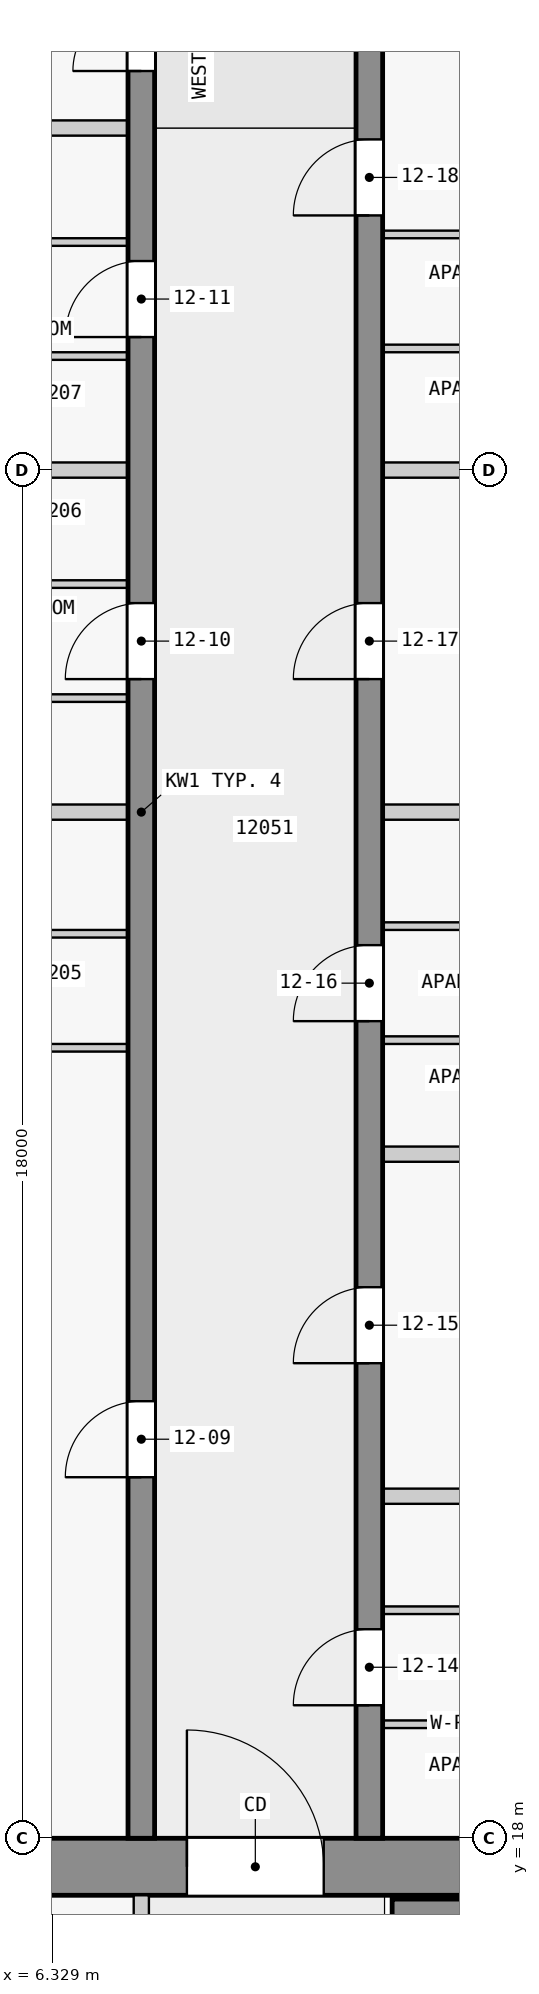
"""IFC4 building model, lengths in metres.
Left out: names, types, materials, properties, quantities, classifications, styles, units other than length and angle.
Written with IfcOpenShell. Run it as: python <this file> out.ifc"""

import sys

from ifc_helpers import new_model, si_unit, direction, frame, frame_2d, origin, place, context, subcontext, project, spatial, rectangle, extrude, element, fill, save


model = new_model("IFC4")
c1 = context("Model", 3, precision=1e-05, world=origin(), true_north=direction((0.0, 1.0)))
c2 = subcontext(c1, "Body", "Model", "MODEL_VIEW")
j1 = project(units=[si_unit("LENGTHUNIT", "METRE"), si_unit("PLANEANGLEUNIT", "RADIAN")], contexts=[c1])
p1 = place(None, origin())
s1 = spatial("IfcSite", under=j1, at=p1, CompositionType="ELEMENT")
p2 = place(p1, origin())
s2 = spatial("IfcBuilding", under=s1, at=p2, CompositionType="ELEMENT")
p3 = place(p2, frame((0.0, 0.0, 51.3)))
s3 = spatial("IfcBuildingStorey", under=s2, at=p3, CompositionType="ELEMENT", Elevation=51.3)
p4 = place(p3, frame((1.55, 17.625, 0.0), z_axis=(0.0, 0.0, 1.0), x_axis=(1.0, 0.0, 0.0)))
e1 = element("IfcWall", 1, at=p4, inside=s3, PredefinedType="SHEAR", context=c2, shape_type="SweptSolid", body=[
    extrude(rectangle(XDim=20.95, YDim=0.75, at=frame_2d((10.475, 0.0))), origin(), (0.0, 0.0, 1.0), 3.25),
])
p5 = place(p4, frame((6.55, 0.0, 0.0)))
e2 = element("IfcOpeningElement", 2, at=p5, cuts=e1, PredefinedType="OPENING", context=c2, shape_type="SweptSolid", body=[
    extrude(rectangle(XDim=1.8, YDim=2.1, at=frame_2d((0.9, 1.05))), frame((0.0, 0.385, 0.0), z_axis=(0.0, -1.0, 0.0), x_axis=(1.0, 0.0, 0.0)), (0.0, 0.0, 1.0), 0.77),
])
p6 = place(p3, frame((10.8, 17.05, 0.0), z_axis=(0.0, 0.0, 1.0), x_axis=(1.0, 0.0, 0.0)))
e3 = element("IfcWall", 3, at=p6, inside=s3, PredefinedType="SHEAR", context=c2, shape_type="SweptSolid", body=[
    extrude(rectangle(XDim=7.8, YDim=0.3, at=frame_2d((3.9, 0.0))), origin(), (0.0, 0.0, 1.0), 3.25),
])
p7 = place(p3, frame((7.5, 18.0, 0.0), z_axis=(0.0, 0.0, 1.0), x_axis=(0.0, 1.0, 0.0)))
e4 = element("IfcWall", 4, at=p7, inside=s3, PredefinedType="SHEAR", context=c2, shape_type="SweptSolid", body=[
    extrude(rectangle(XDim=27.0, YDim=0.35, at=frame_2d((13.5, 0.0))), origin(), (0.0, 0.0, 1.0), 3.25),
])
p8 = place(p7, frame((4.75, 0.0, 0.0)))
e5 = element("IfcOpeningElement", 5, at=p8, cuts=e4, PredefinedType="OPENING", context=c2, shape_type="SweptSolid", body=[
    extrude(rectangle(XDim=1.0, YDim=2.1, at=frame_2d((0.5, 1.05))), frame((0.0, 0.185, 0.0), z_axis=(0.0, -1.0, 0.0), x_axis=(1.0, 0.0, 0.0)), (0.0, 0.0, 1.0), 0.37),
])
p9 = place(p7, frame((15.25, 0.0, 0.0)))
e6 = element("IfcOpeningElement", 6, at=p9, cuts=e4, PredefinedType="OPENING", context=c2, shape_type="SweptSolid", body=[
    extrude(rectangle(XDim=1.0, YDim=2.1, at=frame_2d((0.5, 1.05))), frame((0.0, 0.185, 0.0), z_axis=(0.0, -1.0, 0.0), x_axis=(1.0, 0.0, 0.0)), (0.0, 0.0, 1.0), 0.37),
])
p10 = place(p7, frame((19.75, 0.0, 0.0)))
e7 = element("IfcOpeningElement", 7, at=p10, cuts=e4, PredefinedType="OPENING", context=c2, shape_type="SweptSolid", body=[
    extrude(rectangle(XDim=1.0, YDim=2.1, at=frame_2d((0.5, 1.05))), frame((0.0, 0.185, 0.0), z_axis=(0.0, -1.0, 0.0), x_axis=(1.0, 0.0, 0.0)), (0.0, 0.0, 1.0), 0.37),
])
p11 = place(p7, frame((23.25, 0.0, 0.0)))
e8 = element("IfcOpeningElement", 8, at=p11, cuts=e4, PredefinedType="OPENING", context=c2, shape_type="SweptSolid", body=[
    extrude(rectangle(XDim=0.9, YDim=2.1, at=frame_2d((0.45, 1.05))), frame((0.0, 0.185, 0.0), z_axis=(0.0, -1.0, 0.0), x_axis=(1.0, 0.0, 0.0)), (0.0, 0.0, 1.0), 0.37),
])
p12 = place(p7, frame((25.45, 0.0, 0.0)))
e9 = element("IfcOpeningElement", 9, at=p12, cuts=e4, PredefinedType="OPENING", context=c2, shape_type="SweptSolid", body=[
    extrude(rectangle(XDim=1.0, YDim=2.1, at=frame_2d((0.5, 1.05))), frame((0.0, 0.185, 0.0), z_axis=(0.0, -1.0, 0.0), x_axis=(1.0, 0.0, 0.0)), (0.0, 0.0, 1.0), 0.37),
])
p13 = place(p3, frame((10.5, 18.0, 0.0), z_axis=(0.0, 0.0, 1.0), x_axis=(0.0, 1.0, 0.0)))
e10 = element("IfcWall", 10, at=p13, inside=s3, PredefinedType="SHEAR", context=c2, shape_type="SweptSolid", body=[
    extrude(rectangle(XDim=27.0, YDim=0.35, at=frame_2d((13.5, 0.0))), origin(), (0.0, 0.0, 1.0), 3.25),
])
p14 = place(p13, frame((1.75, 0.0, 0.0)))
e11 = element("IfcOpeningElement", 11, at=p14, cuts=e10, PredefinedType="OPENING", context=c2, shape_type="SweptSolid", body=[
    extrude(rectangle(XDim=1.0, YDim=2.1, at=frame_2d((0.5, 1.05))), frame((0.0, 0.185, 0.0), z_axis=(0.0, -1.0, 0.0), x_axis=(1.0, 0.0, 0.0)), (0.0, 0.0, 1.0), 0.37),
])
p15 = place(p13, frame((6.25, 0.0, 0.0)))
e12 = element("IfcOpeningElement", 12, at=p15, cuts=e10, PredefinedType="OPENING", context=c2, shape_type="SweptSolid", body=[
    extrude(rectangle(XDim=1.0, YDim=2.1, at=frame_2d((0.5, 1.05))), frame((0.0, 0.185, 0.0), z_axis=(0.0, -1.0, 0.0), x_axis=(1.0, 0.0, 0.0)), (0.0, 0.0, 1.0), 0.37),
])
p16 = place(p13, frame((10.75, 0.0, 0.0)))
e13 = element("IfcOpeningElement", 13, at=p16, cuts=e10, PredefinedType="OPENING", context=c2, shape_type="SweptSolid", body=[
    extrude(rectangle(XDim=1.0, YDim=2.1, at=frame_2d((0.5, 1.05))), frame((0.0, 0.185, 0.0), z_axis=(0.0, -1.0, 0.0), x_axis=(1.0, 0.0, 0.0)), (0.0, 0.0, 1.0), 0.37),
])
p17 = place(p13, frame((15.25, 0.0, 0.0)))
e14 = element("IfcOpeningElement", 14, at=p17, cuts=e10, PredefinedType="OPENING", context=c2, shape_type="SweptSolid", body=[
    extrude(rectangle(XDim=1.0, YDim=2.1, at=frame_2d((0.5, 1.05))), frame((0.0, 0.185, 0.0), z_axis=(0.0, -1.0, 0.0), x_axis=(1.0, 0.0, 0.0)), (0.0, 0.0, 1.0), 0.37),
])
p18 = place(p13, frame((21.35, 0.0, 0.0)))
e15 = element("IfcOpeningElement", 15, at=p18, cuts=e10, PredefinedType="OPENING", context=c2, shape_type="SweptSolid", body=[
    extrude(rectangle(XDim=1.0, YDim=2.1, at=frame_2d((0.5, 1.05))), frame((0.0, 0.185, 0.0), z_axis=(0.0, -1.0, 0.0), x_axis=(1.0, 0.0, 0.0)), (0.0, 0.0, 1.0), 0.37),
])
p19 = place(p3, frame((7.5, 10.1, 0.0), z_axis=(0.0, 0.0, 1.0), x_axis=(0.0, 1.0, 0.0)))
e16 = element("IfcWall", 16, at=p19, inside=s3, PredefinedType="PARTITIONING", context=c2, shape_type="SweptSolid", body=[
    extrude(rectangle(XDim=7.15, YDim=0.2, at=frame_2d((3.575, 0.0))), origin(), (0.0, 0.0, 1.0), 3.25),
])
p20 = place(p19, frame((1.5, 0.0, 0.0)))
e17 = element("IfcOpeningElement", 17, at=p20, cuts=e16, PredefinedType="OPENING", context=c2, shape_type="SweptSolid", body=[
    extrude(rectangle(XDim=0.9, YDim=2.1, at=frame_2d((0.45, 1.05))), frame((0.0, 0.11, 0.0), z_axis=(0.0, -1.0, 0.0), x_axis=(1.0, 0.0, 0.0)), (0.0, 0.0, 1.0), 0.22),
])
p21 = place(p19, frame((5.075, 0.0, 0.0)))
e18 = element("IfcOpeningElement", 18, at=p21, cuts=e16, PredefinedType="OPENING", context=c2, shape_type="SweptSolid", body=[
    extrude(rectangle(XDim=0.9, YDim=2.1, at=frame_2d((0.45, 1.05))), frame((0.0, 0.11, 0.0), z_axis=(0.0, -1.0, 0.0), x_axis=(1.0, 0.0, 0.0)), (0.0, 0.0, 1.0), 0.22),
])
p22 = place(p3, frame((14.075, 19.5, 0.0), z_axis=(0.0, 0.0, 1.0), x_axis=(-1.0, 0.0, 0.0)))
e19 = element("IfcWall", 19, at=p22, inside=s3, PredefinedType="PARTITIONING", context=c2, shape_type="SweptSolid", body=[
    extrude(rectangle(XDim=3.4, YDim=0.1, at=frame_2d((1.7, 0.0))), origin(), (0.0, 0.0, 1.0), 3.25),
])
p23 = place(p22, frame((1.25, 0.0, 0.0)))
e20 = element("IfcOpeningElement", 20, at=p23, cuts=e19, PredefinedType="OPENING", context=c2, shape_type="SweptSolid", body=[
    extrude(rectangle(XDim=0.9, YDim=2.1, at=frame_2d((0.45, 1.05))), frame((0.0, 0.06, 0.0), z_axis=(0.0, -1.0, 0.0), x_axis=(1.0, 0.0, 0.0)), (0.0, 0.0, 1.0), 0.12),
])
p24 = place(p3, frame((10.675, 21.0, 0.0), z_axis=(0.0, 0.0, 1.0), x_axis=(1.0, 0.0, 0.0)))
e21 = element("IfcWall", 21, at=p24, inside=s3, PredefinedType="PARTITIONING", context=c2, shape_type="SweptSolid", body=[
    extrude(rectangle(XDim=3.4, YDim=0.1, at=frame_2d((1.7, 0.0))), origin(), (0.0, 0.0, 1.0), 3.25),
])
p25 = place(p24, frame((1.25, 0.0, 0.0)))
e22 = element("IfcOpeningElement", 22, at=p25, cuts=e21, PredefinedType="OPENING", context=c2, shape_type="SweptSolid", body=[
    extrude(rectangle(XDim=0.9, YDim=2.1, at=frame_2d((0.45, 1.05))), frame((0.0, 0.06, 0.0), z_axis=(0.0, -1.0, 0.0), x_axis=(1.0, 0.0, 0.0)), (0.0, 0.0, 1.0), 0.12),
])
p26 = place(p3, frame((13.975, 22.5, 0.0), z_axis=(0.0, 0.0, 1.0), x_axis=(-1.0, 0.0, 0.0)))
e23 = element("IfcWall", 23, at=p26, inside=s3, PredefinedType="PARTITIONING", context=c2, shape_type="SweptSolid", body=[
    extrude(rectangle(XDim=3.3, YDim=0.2, at=frame_2d((1.65, 0.0))), origin(), (0.0, 0.0, 1.0), 3.25),
])
p27 = place(p3, frame((18.08, 27.0, 0.0), z_axis=(0.0, 0.0, 1.0), x_axis=(-1.0, 0.0, 0.0)))
e24 = element("IfcWall", 24, at=p27, inside=s3, PredefinedType="PARTITIONING", context=c2, shape_type="SweptSolid", body=[
    extrude(rectangle(XDim=7.405, YDim=0.2, at=frame_2d((3.703, 0.0))), origin(), (0.0, 0.0, 1.0), 3.25),
])
p28 = place(p3, frame((3.975, 28.4, 0.0), z_axis=(0.0, 0.0, 1.0), x_axis=(1.0, 0.0, 0.0)))
e25 = element("IfcWall", 25, at=p28, inside=s3, PredefinedType="PARTITIONING", context=c2, shape_type="SweptSolid", body=[
    extrude(rectangle(XDim=3.35, YDim=0.1, at=frame_2d((1.675, 0.0))), origin(), (0.0, 0.0, 1.0), 3.25),
])
p29 = place(p28, frame((1.25, 0.0, 0.0)))
e26 = element("IfcOpeningElement", 26, at=p29, cuts=e25, PredefinedType="OPENING", context=c2, shape_type="SweptSolid", body=[
    extrude(rectangle(XDim=0.9, YDim=2.1, at=frame_2d((0.45, 1.05))), frame((0.0, 0.06, 0.0), z_axis=(0.0, -1.0, 0.0), x_axis=(1.0, 0.0, 0.0)), (0.0, 0.0, 1.0), 0.12),
])
p30 = place(p3, frame((14.075, 28.5, 0.0), z_axis=(0.0, 0.0, 1.0), x_axis=(-1.0, 0.0, 0.0)))
e27 = element("IfcWall", 27, at=p30, inside=s3, PredefinedType="PARTITIONING", context=c2, shape_type="SweptSolid", body=[
    extrude(rectangle(XDim=3.4, YDim=0.1, at=frame_2d((1.7, 0.0))), origin(), (0.0, 0.0, 1.0), 3.25),
])
p31 = place(p30, frame((1.25, 0.0, 0.0)))
e28 = element("IfcOpeningElement", 28, at=p31, cuts=e27, PredefinedType="OPENING", context=c2, shape_type="SweptSolid", body=[
    extrude(rectangle(XDim=0.9, YDim=2.1, at=frame_2d((0.45, 1.05))), frame((0.0, 0.06, 0.0), z_axis=(0.0, -1.0, 0.0), x_axis=(1.0, 0.0, 0.0)), (0.0, 0.0, 1.0), 0.12),
])
p32 = place(p3, frame((7.325, 29.9, 0.0), z_axis=(0.0, 0.0, 1.0), x_axis=(-1.0, 0.0, 0.0)))
e29 = element("IfcWall", 29, at=p32, inside=s3, PredefinedType="PARTITIONING", context=c2, shape_type="SweptSolid", body=[
    extrude(rectangle(XDim=3.35, YDim=0.1, at=frame_2d((1.675, 0.0))), origin(), (0.0, 0.0, 1.0), 3.25),
])
p33 = place(p3, frame((10.675, 30.0, 0.0), z_axis=(0.0, 0.0, 1.0), x_axis=(1.0, 0.0, 0.0)))
e30 = element("IfcWall", 30, at=p33, inside=s3, PredefinedType="PARTITIONING", context=c2, shape_type="SweptSolid", body=[
    extrude(rectangle(XDim=3.4, YDim=0.1, at=frame_2d((1.7, 0.0))), origin(), (0.0, 0.0, 1.0), 3.25),
])
p34 = place(p33, frame((1.25, 0.0, 0.0)))
e31 = element("IfcOpeningElement", 31, at=p34, cuts=e30, PredefinedType="OPENING", context=c2, shape_type="SweptSolid", body=[
    extrude(rectangle(XDim=0.9, YDim=2.1, at=frame_2d((0.45, 1.05))), frame((0.0, 0.06, 0.0), z_axis=(0.0, -1.0, 0.0), x_axis=(1.0, 0.0, 0.0)), (0.0, 0.0, 1.0), 0.12),
])
for number, where, z_axis, x_axis in (
    (32, (7.325, 31.5, 0.0), (0.0, 0.0, 1.0), (-1.0, 0.0, 0.0)),
    (33, (13.975, 31.5, 0.0), (0.0, 0.0, 1.0), (-1.0, 0.0, 0.0)),
):
    element("IfcWall", number, at=place(p3, frame(where, z_axis=z_axis, x_axis=x_axis)), inside=s3, PredefinedType="PARTITIONING", context=c2, shape_type="SweptSolid", body=[
        extrude(rectangle(XDim=3.3, YDim=0.2, at=frame_2d((1.65, 0.0))), origin(), (0.0, 0.0, 1.0), 3.25),
    ])
p35 = place(p3, frame((7.325, 33.0, 0.0), z_axis=(0.0, 0.0, 1.0), x_axis=(-1.0, 0.0, 0.0)))
e34 = element("IfcWall", 34, at=p35, inside=s3, PredefinedType="PARTITIONING", context=c2, shape_type="SweptSolid", body=[
    extrude(rectangle(XDim=3.35, YDim=0.1, at=frame_2d((1.675, 0.0))), origin(), (0.0, 0.0, 1.0), 3.25),
])
p36 = place(p35, frame((1.25, 0.0, 0.0)))
e35 = element("IfcOpeningElement", 35, at=p36, cuts=e34, PredefinedType="OPENING", context=c2, shape_type="SweptSolid", body=[
    extrude(rectangle(XDim=0.9, YDim=2.1, at=frame_2d((0.45, 1.05))), frame((0.0, 0.06, 0.0), z_axis=(0.0, -1.0, 0.0), x_axis=(1.0, 0.0, 0.0)), (0.0, 0.0, 1.0), 0.12),
])
p37 = place(p3, frame((3.925, 34.5, 0.0), z_axis=(0.0, 0.0, 1.0), x_axis=(1.0, 0.0, 0.0)))
e36 = element("IfcWall", 36, at=p37, inside=s3, PredefinedType="PARTITIONING", context=c2, shape_type="SweptSolid", body=[
    extrude(rectangle(XDim=3.4, YDim=0.1, at=frame_2d((1.7, 0.0))), origin(), (0.0, 0.0, 1.0), 3.25),
])
p38 = place(p37, frame((1.25, 0.0, 0.0)))
e37 = element("IfcOpeningElement", 37, at=p38, cuts=e36, PredefinedType="OPENING", context=c2, shape_type="SweptSolid", body=[
    extrude(rectangle(XDim=0.9, YDim=2.1, at=frame_2d((0.45, 1.05))), frame((0.0, 0.06, 0.0), z_axis=(0.0, -1.0, 0.0), x_axis=(1.0, 0.0, 0.0)), (0.0, 0.0, 1.0), 0.12),
])
p39 = place(p3, frame((7.325, 36.0, 0.0), z_axis=(0.0, 0.0, 1.0), x_axis=(-1.0, 0.0, 0.0)))
e38 = element("IfcWall", 38, at=p39, inside=s3, PredefinedType="PARTITIONING", context=c2, shape_type="SweptSolid", body=[
    extrude(rectangle(XDim=3.4, YDim=0.2, at=frame_2d((1.7, 0.0))), origin(), (0.0, 0.0, 1.0), 3.25),
])
p40 = place(p3, frame((16.6, 36.0, 0.0), z_axis=(0.0, 0.0, 1.0), x_axis=(-1.0, 0.0, 0.0)))
e39 = element("IfcWall", 39, at=p40, inside=s3, PredefinedType="PARTITIONING", context=c2, shape_type="SweptSolid", body=[
    extrude(rectangle(XDim=5.925, YDim=0.2, at=frame_2d((2.962, 0.0))), origin(), (0.0, 0.0, 1.0), 3.25),
])
p41 = place(p3, frame((7.325, 37.5, 0.0), z_axis=(0.0, 0.0, 1.0), x_axis=(-1.0, 0.0, 0.0)))
e40 = element("IfcWall", 40, at=p41, inside=s3, PredefinedType="PARTITIONING", context=c2, shape_type="SweptSolid", body=[
    extrude(rectangle(XDim=3.4, YDim=0.1, at=frame_2d((1.7, 0.0))), origin(), (0.0, 0.0, 1.0), 3.25),
])
p42 = place(p41, frame((1.25, 0.0, 0.0)))
e41 = element("IfcOpeningElement", 41, at=p42, cuts=e40, PredefinedType="OPENING", context=c2, shape_type="SweptSolid", body=[
    extrude(rectangle(XDim=0.9, YDim=2.1, at=frame_2d((0.45, 1.05))), frame((0.0, 0.06, 0.0), z_axis=(0.0, -1.0, 0.0), x_axis=(1.0, 0.0, 0.0)), (0.0, 0.0, 1.0), 0.12),
])
p43 = place(p3, frame((14.075, 37.6, 0.0), z_axis=(0.0, 0.0, 1.0), x_axis=(-1.0, 0.0, 0.0)))
e42 = element("IfcWall", 42, at=p43, inside=s3, PredefinedType="PARTITIONING", context=c2, shape_type="SweptSolid", body=[
    extrude(rectangle(XDim=3.4, YDim=0.1, at=frame_2d((1.7, 0.0))), origin(), (0.0, 0.0, 1.0), 3.25),
])
p44 = place(p3, frame((3.925, 39.0, 0.0), z_axis=(0.0, 0.0, 1.0), x_axis=(1.0, 0.0, 0.0)))
e43 = element("IfcWall", 43, at=p44, inside=s3, PredefinedType="PARTITIONING", context=c2, shape_type="SweptSolid", body=[
    extrude(rectangle(XDim=3.4, YDim=0.1, at=frame_2d((1.7, 0.0))), origin(), (0.0, 0.0, 1.0), 3.25),
])
p45 = place(p44, frame((1.25, 0.0, 0.0)))
e44 = element("IfcOpeningElement", 44, at=p45, cuts=e43, PredefinedType="OPENING", context=c2, shape_type="SweptSolid", body=[
    extrude(rectangle(XDim=0.9, YDim=2.1, at=frame_2d((0.45, 1.05))), frame((0.0, 0.06, 0.0), z_axis=(0.0, -1.0, 0.0), x_axis=(1.0, 0.0, 0.0)), (0.0, 0.0, 1.0), 0.12),
])
p46 = place(p3, frame((14.075, 39.1, 0.0), z_axis=(0.0, 0.0, 1.0), x_axis=(-1.0, 0.0, 0.0)))
e45 = element("IfcWall", 45, at=p46, inside=s3, PredefinedType="PARTITIONING", context=c2, shape_type="SweptSolid", body=[
    extrude(rectangle(XDim=3.4, YDim=0.1, at=frame_2d((1.7, 0.0))), origin(), (0.0, 0.0, 1.0), 3.25),
])
p47 = place(p46, frame((1.25, 0.0, 0.0)))
e46 = element("IfcOpeningElement", 46, at=p47, cuts=e45, PredefinedType="OPENING", context=c2, shape_type="SweptSolid", body=[
    extrude(rectangle(XDim=0.9, YDim=2.1, at=frame_2d((0.45, 1.05))), frame((0.0, 0.06, 0.0), z_axis=(0.0, -1.0, 0.0), x_axis=(1.0, 0.0, 0.0)), (0.0, 0.0, 1.0), 0.12),
])
p48 = place(p3, frame((7.325, 40.5, 0.0), z_axis=(0.0, 0.0, 1.0), x_axis=(-1.0, 0.0, 0.0)))
e47 = element("IfcWall", 47, at=p48, inside=s3, PredefinedType="PARTITIONING", context=c2, shape_type="SweptSolid", body=[
    extrude(rectangle(XDim=3.3, YDim=0.2, at=frame_2d((1.65, 0.0))), origin(), (0.0, 0.0, 1.0), 3.25),
])
p49 = place(p5, origin())
e48 = element("IfcDoor", 48, at=p49, inside=s3, OperationType="DOUBLE_DOOR_SINGLE_SWING", PredefinedType="DOOR", context=c2, shape_type="SweptSolid", body=[
    extrude(rectangle(XDim=1.8, YDim=2.1, at=frame_2d((0.9, 1.05))), frame((0.0, 0.025, 0.0), z_axis=(0.0, -1.0, 0.0), x_axis=(1.0, 0.0, 0.0)), (0.0, 0.0, 1.0), 0.05),
])
fill(e2, e48)
p50 = place(p8, origin())
e49 = element("IfcDoor", 49, at=p50, inside=s3, OperationType="SINGLE_SWING_LEFT", PredefinedType="DOOR", context=c2, shape_type="SweptSolid", body=[
    extrude(rectangle(XDim=1.0, YDim=2.1, at=frame_2d((0.5, 1.05))), frame((0.0, 0.025, 0.0), z_axis=(0.0, -1.0, 0.0), x_axis=(1.0, 0.0, 0.0)), (0.0, 0.0, 1.0), 0.05),
])
fill(e5, e49)
p51 = place(p9, origin())
e50 = element("IfcDoor", 50, at=p51, inside=s3, OperationType="SINGLE_SWING_RIGHT", PredefinedType="DOOR", context=c2, shape_type="SweptSolid", body=[
    extrude(rectangle(XDim=1.0, YDim=2.1, at=frame_2d((0.5, 1.05))), frame((0.0, 0.025, 0.0), z_axis=(0.0, -1.0, 0.0), x_axis=(1.0, 0.0, 0.0)), (0.0, 0.0, 1.0), 0.05),
])
fill(e6, e50)
p52 = place(p10, origin())
e51 = element("IfcDoor", 51, at=p52, inside=s3, OperationType="SINGLE_SWING_RIGHT", PredefinedType="DOOR", context=c2, shape_type="SweptSolid", body=[
    extrude(rectangle(XDim=1.0, YDim=2.1, at=frame_2d((0.5, 1.05))), frame((0.0, 0.025, 0.0), z_axis=(0.0, -1.0, 0.0), x_axis=(1.0, 0.0, 0.0)), (0.0, 0.0, 1.0), 0.05),
])
fill(e7, e51)
p53 = place(p11, origin())
e52 = element("IfcDoor", 52, at=p53, inside=s3, OperationType="SINGLE_SWING_RIGHT", PredefinedType="DOOR", context=c2, shape_type="SweptSolid", body=[
    extrude(rectangle(XDim=0.9, YDim=2.1, at=frame_2d((0.45, 1.05))), frame((0.0, 0.025, 0.0), z_axis=(0.0, -1.0, 0.0), x_axis=(1.0, 0.0, 0.0)), (0.0, 0.0, 1.0), 0.05),
])
fill(e8, e52)
p54 = place(p14, origin())
e53 = element("IfcDoor", 53, at=p54, inside=s3, OperationType="SINGLE_SWING_LEFT", PredefinedType="DOOR", context=c2, shape_type="SweptSolid", body=[
    extrude(rectangle(XDim=1.0, YDim=2.1, at=frame_2d((0.5, 1.05))), frame((0.0, 0.025, 0.0), z_axis=(0.0, -1.0, 0.0), x_axis=(1.0, 0.0, 0.0)), (0.0, 0.0, 1.0), 0.05),
])
fill(e11, e53)
p55 = place(p15, origin())
e54 = element("IfcDoor", 54, at=p55, inside=s3, OperationType="SINGLE_SWING_LEFT", PredefinedType="DOOR", context=c2, shape_type="SweptSolid", body=[
    extrude(rectangle(XDim=1.0, YDim=2.1, at=frame_2d((0.5, 1.05))), frame((0.0, 0.025, 0.0), z_axis=(0.0, -1.0, 0.0), x_axis=(1.0, 0.0, 0.0)), (0.0, 0.0, 1.0), 0.05),
])
fill(e12, e54)
p56 = place(p16, origin())
e55 = element("IfcDoor", 55, at=p56, inside=s3, OperationType="SINGLE_SWING_LEFT", PredefinedType="DOOR", context=c2, shape_type="SweptSolid", body=[
    extrude(rectangle(XDim=1.0, YDim=2.1, at=frame_2d((0.5, 1.05))), frame((0.0, 0.025, 0.0), z_axis=(0.0, -1.0, 0.0), x_axis=(1.0, 0.0, 0.0)), (0.0, 0.0, 1.0), 0.05),
])
fill(e13, e55)
p57 = place(p17, origin())
e56 = element("IfcDoor", 56, at=p57, inside=s3, OperationType="SINGLE_SWING_RIGHT", PredefinedType="DOOR", context=c2, shape_type="SweptSolid", body=[
    extrude(rectangle(XDim=1.0, YDim=2.1, at=frame_2d((0.5, 1.05))), frame((0.0, 0.025, 0.0), z_axis=(0.0, -1.0, 0.0), x_axis=(1.0, 0.0, 0.0)), (0.0, 0.0, 1.0), 0.05),
])
fill(e14, e56)
p58 = place(p18, origin())
e57 = element("IfcDoor", 57, at=p58, inside=s3, OperationType="SINGLE_SWING_RIGHT", PredefinedType="DOOR", context=c2, shape_type="SweptSolid", body=[
    extrude(rectangle(XDim=1.0, YDim=2.1, at=frame_2d((0.5, 1.05))), frame((0.0, 0.025, 0.0), z_axis=(0.0, -1.0, 0.0), x_axis=(1.0, 0.0, 0.0)), (0.0, 0.0, 1.0), 0.05),
])
fill(e15, e57)
save(model, sys.argv[1])
